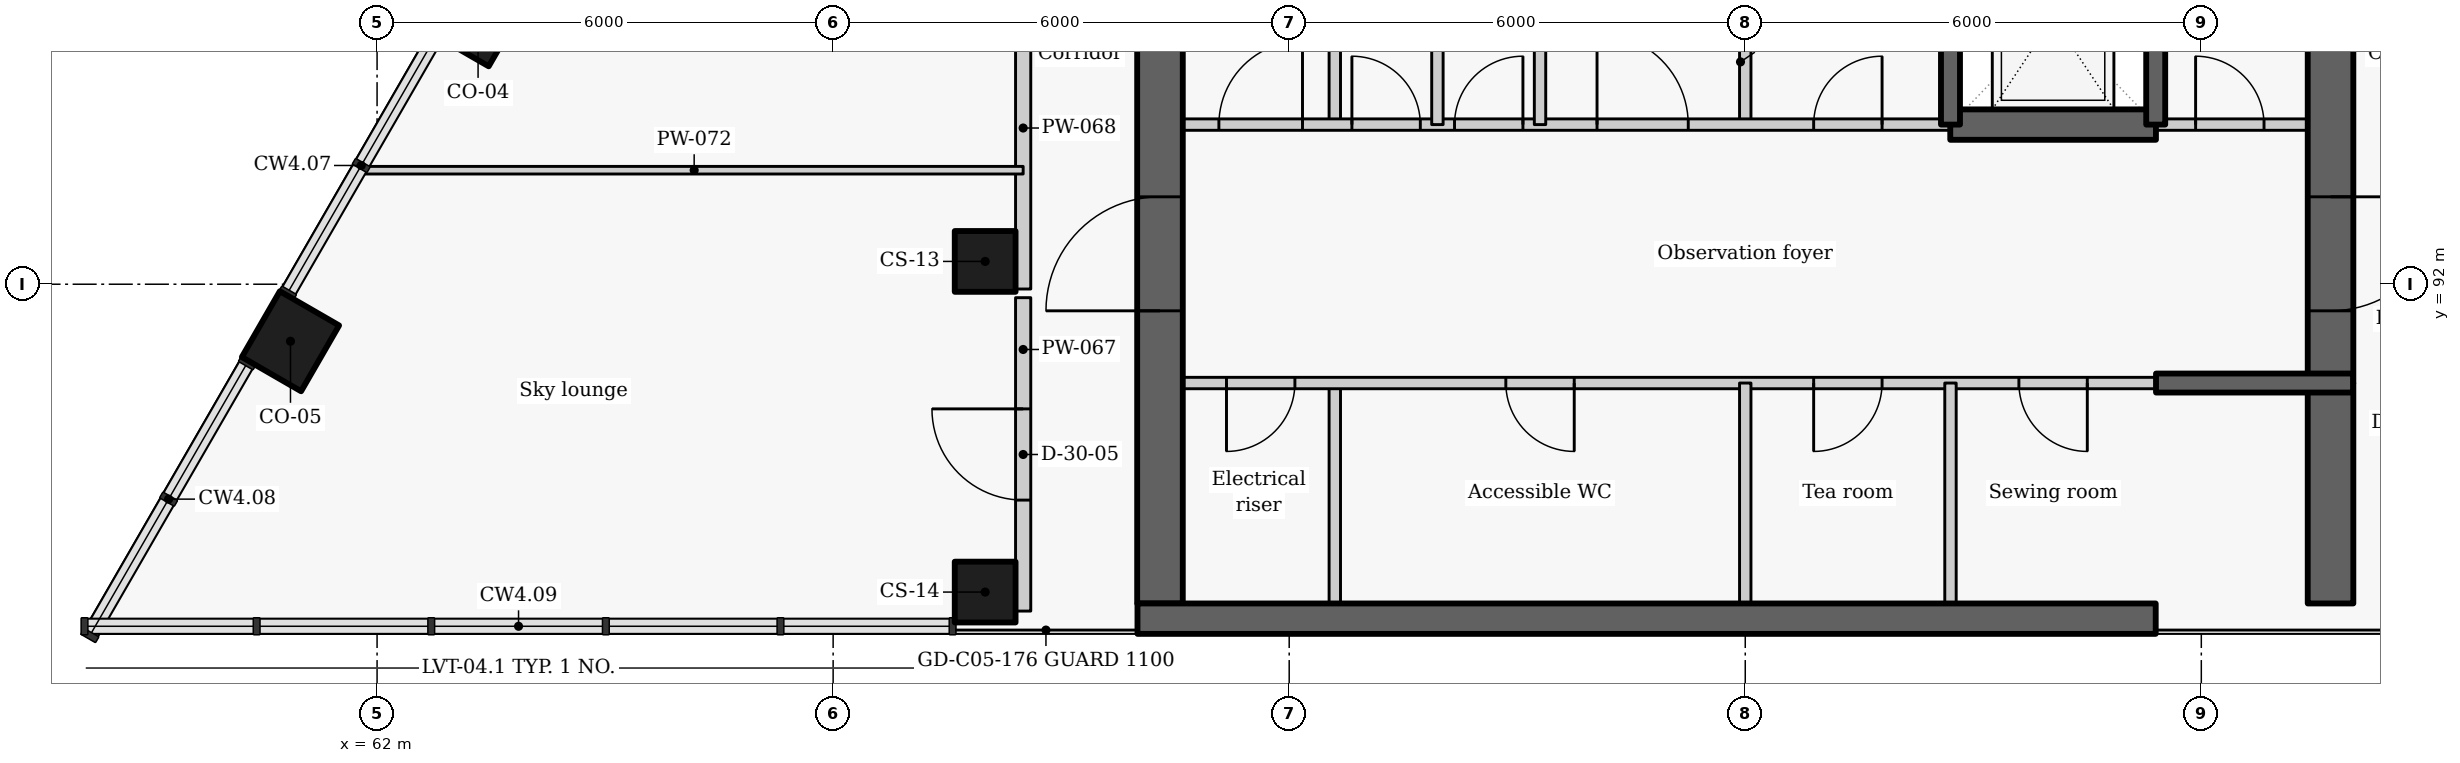
"""IFC4 building model, lengths in metres.
Left out: names, types, materials, properties, quantities, classifications, styles, units other than length and angle.
Written with IfcOpenShell. Run it as: python <this file> out.ifc"""

import sys

from ifc_helpers import new_model, si_unit, direction, frame, frame_2d, origin, origin_2d, place, context, subcontext, project, spatial, rectangle, extrude, element, fill, save


model = new_model("IFC4")
c1 = context("Model", 3, precision=1e-05, world=origin(), true_north=direction((0.0, 1.0)))
c2 = subcontext(c1, "Body", "Model", "MODEL_VIEW")
j1 = project(units=[si_unit("LENGTHUNIT", "METRE"), si_unit("PLANEANGLEUNIT", "RADIAN")], contexts=[c1])
p1 = place(None, origin())
s1 = spatial("IfcSite", under=j1, at=p1, CompositionType="ELEMENT")
p2 = place(p1, origin())
s2 = spatial("IfcBuilding", under=s1, at=p2, CompositionType="ELEMENT")
p3 = place(p2, frame((0.0, 0.0, 286.8)))
s3 = spatial("IfcBuildingStorey", under=s2, at=p3, CompositionType="ELEMENT", Elevation=286.8)
for number, where, z_axis, x_axis in (
    (1, (63.329, 95.525, 0.0), (0.0, 0.0, 1.0), (-0.5, -0.866, 0.0)),
    (2, (60.861, 91.25, 0.0), (0.0, 0.0, 1.0), (-0.5, -0.866, 0.0)),
):
    element("IfcColumn", number, at=place(p3, frame(where, z_axis=z_axis, x_axis=x_axis)), inside=s3, PredefinedType="COLUMN", context=c2, shape_type="SweptSolid", body=[
        extrude(rectangle(XDim=1.0, YDim=0.9, at=origin_2d()), origin(), (0.0, 0.0, 1.0), 3.6),
    ])
for number, where, z_axis, x_axis in (
    (3, (70.0, 92.3, 0.0), (0.0, 0.0, 1.0), (0.0, -1.0, 0.0)),
    (4, (70.0, 87.95, 0.0), (0.0, 0.0, 1.0), (0.0, -1.0, 0.0)),
):
    element("IfcColumn", number, at=place(p3, frame(where, z_axis=z_axis, x_axis=x_axis)), inside=s3, PredefinedType="COLUMN", context=c2, shape_type="SweptSolid", body=[
        extrude(rectangle(XDim=0.8, YDim=0.8, at=origin_2d()), origin(), (0.0, 0.0, 1.0), 3.6),
    ])
p4 = place(p3, frame((74.6, 87.8, 0.0), z_axis=(0.0, 0.0, 1.0), x_axis=(0.0, 1.0, 0.0)))
e5 = element("IfcWall", 5, at=p4, inside=s3, PredefinedType="PARTITIONING", context=c2, shape_type="SweptSolid", body=[
    extrude(rectangle(XDim=2.9, YDim=0.15, at=frame_2d((1.45, 0.0))), origin(), (0.0, 0.0, 1.0), 3.325),
])
p5 = place(p3, frame((74.6, 94.1, 0.0), z_axis=(0.0, 0.0, 1.0), x_axis=(0.0, 1.0, 0.0)))
e6 = element("IfcWall", 6, at=p5, inside=s3, PredefinedType="PARTITIONING", context=c2, shape_type="SweptSolid", body=[
    extrude(rectangle(XDim=2.8, YDim=0.15, at=frame_2d((1.4, 0.0))), origin(), (0.0, 0.0, 1.0), 3.325),
])
p6 = place(p3, frame((85.4, 90.7, 0.0), z_axis=(0.0, 0.0, 1.0), x_axis=(-1.0, 0.0, 0.0)))
e7 = element("IfcWall", 7, at=p6, inside=s3, PredefinedType="PARTITIONING", context=c2, shape_type="SweptSolid", body=[
    extrude(rectangle(XDim=13.4, YDim=0.15, at=frame_2d((6.7, 0.0))), origin(), (0.0, 0.0, 1.0), 3.325),
])
p7 = place(p6, frame((11.325, 0.0, 0.0)))
e8 = element("IfcOpeningElement", 8, at=p7, cuts=e7, PredefinedType="OPENING", context=c2, shape_type="SweptSolid", body=[
    extrude(rectangle(XDim=0.9, YDim=2.1, at=frame_2d((0.45, 1.05))), frame((0.0, 0.085, 0.0), z_axis=(0.0, -1.0, 0.0), x_axis=(1.0, 0.0, 0.0)), (0.0, 0.0, 1.0), 0.17),
])
p8 = place(p6, frame((7.65, 0.0, 0.0)))
e9 = element("IfcOpeningElement", 9, at=p8, cuts=e7, PredefinedType="OPENING", context=c2, shape_type="SweptSolid", body=[
    extrude(rectangle(XDim=0.9, YDim=2.1, at=frame_2d((0.45, 1.05))), frame((0.0, 0.085, 0.0), z_axis=(0.0, -1.0, 0.0), x_axis=(1.0, 0.0, 0.0)), (0.0, 0.0, 1.0), 0.17),
])
p9 = place(p6, frame((3.6, 0.0, 0.0)))
e10 = element("IfcOpeningElement", 10, at=p9, cuts=e7, PredefinedType="OPENING", context=c2, shape_type="SweptSolid", body=[
    extrude(rectangle(XDim=0.9, YDim=2.1, at=frame_2d((0.45, 1.05))), frame((0.0, 0.085, 0.0), z_axis=(0.0, -1.0, 0.0), x_axis=(1.0, 0.0, 0.0)), (0.0, 0.0, 1.0), 0.17),
])
p10 = place(p6, frame((0.9, 0.0, 0.0)))
e11 = element("IfcOpeningElement", 11, at=p10, cuts=e7, PredefinedType="OPENING", context=c2, shape_type="SweptSolid", body=[
    extrude(rectangle(XDim=0.9, YDim=2.1, at=frame_2d((0.45, 1.05))), frame((0.0, 0.085, 0.0), z_axis=(0.0, -1.0, 0.0), x_axis=(1.0, 0.0, 0.0)), (0.0, 0.0, 1.0), 0.17),
])
p11 = place(p3, frame((72.3, 87.8, -0.275), z_axis=(0.0, 0.0, 1.0), x_axis=(0.0, 1.0, 0.0)))
e12 = element("IfcWall", 12, at=p11, inside=s3, PredefinedType="SHEAR", context=c2, shape_type="SweptSolid", body=[
    extrude(rectangle(XDim=9.1, YDim=0.6, at=frame_2d((4.55, 0.0))), origin(), (0.0, 0.0, 1.0), 3.6),
])
p12 = place(p11, frame((3.85, 0.0, 0.275)))
e13 = element("IfcOpeningElement", 13, at=p12, cuts=e12, PredefinedType="OPENING", context=c2, shape_type="SweptSolid", body=[
    extrude(rectangle(XDim=1.5, YDim=2.1, at=frame_2d((0.75, 1.05))), frame((0.0, 0.31, 0.0), z_axis=(0.0, -1.0, 0.0), x_axis=(1.0, 0.0, 0.0)), (0.0, 0.0, 1.0), 0.62),
])
p13 = place(p3, frame((80.0, 87.8, 0.0), z_axis=(0.0, 0.0, 1.0), x_axis=(0.0, 1.0, 0.0)))
e14 = element("IfcWall", 14, at=p13, inside=s3, PredefinedType="PARTITIONING", context=c2, shape_type="SweptSolid", body=[
    extrude(rectangle(XDim=2.9, YDim=0.15, at=frame_2d((1.45, 0.0))), origin(), (0.0, 0.0, 1.0), 3.325),
])
p14 = place(p3, frame((80.0, 94.1, 0.0), z_axis=(0.0, 0.0, 1.0), x_axis=(0.0, 1.0, 0.0)))
e15 = element("IfcWall", 15, at=p14, inside=s3, PredefinedType="PARTITIONING", context=c2, shape_type="SweptSolid", body=[
    extrude(rectangle(XDim=2.8, YDim=0.15, at=frame_2d((1.4, 0.0))), origin(), (0.0, 0.0, 1.0), 3.325),
])
p15 = place(p3, frame((82.7, 87.8, 0.0), z_axis=(0.0, 0.0, 1.0), x_axis=(0.0, 1.0, 0.0)))
e16 = element("IfcWall", 16, at=p15, inside=s3, PredefinedType="PARTITIONING", context=c2, shape_type="SweptSolid", body=[
    extrude(rectangle(XDim=2.9, YDim=0.15, at=frame_2d((1.45, 0.0))), origin(), (0.0, 0.0, 1.0), 3.325),
])
p16 = place(p3, frame((72.0, 94.1, 0.0), z_axis=(0.0, 0.0, 1.0), x_axis=(1.0, 0.0, 0.0)))
e17 = element("IfcWall", 17, at=p16, inside=s3, PredefinedType="PARTITIONING", context=c2, shape_type="SweptSolid", body=[
    extrude(rectangle(XDim=10.703, YDim=0.15, at=frame_2d((5.352, 0.0))), origin(), (0.0, 0.0, 1.0), 3.325),
])
p17 = place(p16, frame((1.075, 0.0, 0.0)))
e18 = element("IfcOpeningElement", 18, at=p17, cuts=e17, PredefinedType="OPENING", context=c2, shape_type="SweptSolid", body=[
    extrude(rectangle(XDim=1.1, YDim=2.1, at=frame_2d((0.55, 1.05))), frame((0.0, 0.085, 0.0), z_axis=(0.0, -1.0, 0.0), x_axis=(1.0, 0.0, 0.0)), (0.0, 0.0, 1.0), 0.17),
])
p18 = place(p16, frame((2.825, 0.0, 0.0)))
e19 = element("IfcOpeningElement", 19, at=p18, cuts=e17, PredefinedType="OPENING", context=c2, shape_type="SweptSolid", body=[
    extrude(rectangle(XDim=0.9, YDim=2.1, at=frame_2d((0.45, 1.05))), frame((0.0, 0.085, 0.0), z_axis=(0.0, -1.0, 0.0), x_axis=(1.0, 0.0, 0.0)), (0.0, 0.0, 1.0), 0.17),
])
p19 = place(p16, frame((4.175, 0.0, 0.0)))
e20 = element("IfcOpeningElement", 20, at=p19, cuts=e17, PredefinedType="OPENING", context=c2, shape_type="SweptSolid", body=[
    extrude(rectangle(XDim=0.9, YDim=2.1, at=frame_2d((0.45, 1.05))), frame((0.0, 0.085, 0.0), z_axis=(0.0, -1.0, 0.0), x_axis=(1.0, 0.0, 0.0)), (0.0, 0.0, 1.0), 0.17),
])
p20 = place(p16, frame((6.05, 0.0, 0.0)))
e21 = element("IfcOpeningElement", 21, at=p20, cuts=e17, PredefinedType="OPENING", context=c2, shape_type="SweptSolid", body=[
    extrude(rectangle(XDim=1.2, YDim=2.1, at=frame_2d((0.6, 1.05))), frame((0.0, 0.085, 0.0), z_axis=(0.0, -1.0, 0.0), x_axis=(1.0, 0.0, 0.0)), (0.0, 0.0, 1.0), 0.17),
])
p21 = place(p16, frame((8.9, 0.0, 0.0)))
e22 = element("IfcOpeningElement", 22, at=p21, cuts=e17, PredefinedType="OPENING", context=c2, shape_type="SweptSolid", body=[
    extrude(rectangle(XDim=0.9, YDim=2.1, at=frame_2d((0.45, 1.05))), frame((0.0, 0.085, 0.0), z_axis=(0.0, -1.0, 0.0), x_axis=(1.0, 0.0, 0.0)), (0.0, 0.0, 1.0), 0.17),
])
p22 = place(p3, frame((85.397, 94.1, 0.0), z_axis=(0.0, 0.0, 1.0), x_axis=(1.0, 0.0, 0.0)))
e23 = element("IfcWall", 23, at=p22, inside=s3, PredefinedType="PARTITIONING", context=c2, shape_type="SweptSolid", body=[
    extrude(rectangle(XDim=2.603, YDim=0.15, at=frame_2d((1.302, 0.0))), origin(), (0.0, 0.0, 1.0), 3.325),
])
p23 = place(p22, frame((0.528, 0.0, 0.0)))
e24 = element("IfcOpeningElement", 24, at=p23, cuts=e23, PredefinedType="OPENING", context=c2, shape_type="SweptSolid", body=[
    extrude(rectangle(XDim=0.9, YDim=2.1, at=frame_2d((0.45, 1.05))), frame((0.0, 0.085, 0.0), z_axis=(0.0, -1.0, 0.0), x_axis=(1.0, 0.0, 0.0)), (0.0, 0.0, 1.0), 0.17),
])
p24 = place(p3, frame((82.697, 94.1, -0.275), z_axis=(0.0, 0.0, 1.0), x_axis=(1.0, 0.0, 0.0)))
e25 = element("IfcWall", 25, at=p24, inside=s3, PredefinedType="SHEAR", context=c2, shape_type="SweptSolid", body=[
    extrude(rectangle(XDim=2.706, YDim=0.4, at=frame_2d((1.353, 0.0))), origin(), (0.0, 0.0, 1.0), 3.6),
])
p25 = place(p3, frame((87.7, 102.05, -0.275), z_axis=(0.0, 0.0, 1.0), x_axis=(0.0, -1.0, 0.0)))
e26 = element("IfcWall", 26, at=p25, inside=s3, PredefinedType="SHEAR", context=c2, shape_type="SweptSolid", body=[
    extrude(rectangle(XDim=11.35, YDim=0.6, at=frame_2d((5.675, 0.0))), origin(), (0.0, 0.0, 1.0), 3.6),
])
p26 = place(p25, frame((8.9, 0.0, 0.275)))
e27 = element("IfcOpeningElement", 27, at=p26, cuts=e26, PredefinedType="OPENING", context=c2, shape_type="SweptSolid", body=[
    extrude(rectangle(XDim=1.5, YDim=2.1, at=frame_2d((0.75, 1.05))), frame((0.0, 0.31, 0.0), z_axis=(0.0, -1.0, 0.0), x_axis=(1.0, 0.0, 0.0)), (0.0, 0.0, 1.0), 0.62),
])
p27 = place(p25, frame((2.025, 0.0, 0.275)))
e28 = element("IfcOpeningElement", 28, at=p27, cuts=e26, PredefinedType="OPENING", context=c2, shape_type="SweptSolid", body=[
    extrude(rectangle(XDim=1.1, YDim=2.1, at=frame_2d((0.55, 1.05))), frame((0.0, 0.31, 0.0), z_axis=(0.0, -1.0, 0.0), x_axis=(1.0, 0.0, 0.0)), (0.0, 0.0, 1.0), 0.62),
])
for number, where, z_axis, x_axis in (
    (29, (75.95, 94.1, 0.0), (0.0, 0.0, 1.0), (0.0, 1.0, 0.0)),
    (30, (77.3, 94.1, 0.0), (0.0, 0.0, 1.0), (0.0, 1.0, 0.0)),
):
    element("IfcWall", number, at=place(p3, frame(where, z_axis=z_axis, x_axis=x_axis)), inside=s3, PredefinedType="PARTITIONING", context=c2, shape_type="SweptSolid", body=[
        extrude(rectangle(XDim=2.8, YDim=0.15, at=frame_2d((1.4, 0.0))), origin(), (0.0, 0.0, 1.0), 3.325),
    ])
for number, where, z_axis, x_axis in (
    (31, (82.7, 94.1, -0.275), (0.0, 0.0, 1.0), (0.0, 1.0, 0.0)),
    (32, (85.4, 94.1, -0.275), (0.0, 0.0, 1.0), (0.0, 1.0, 0.0)),
):
    element("IfcWall", number, at=place(p3, frame(where, z_axis=z_axis, x_axis=x_axis)), inside=s3, PredefinedType="SHEAR", context=c2, shape_type="SweptSolid", body=[
        extrude(rectangle(XDim=2.8, YDim=0.25, at=frame_2d((1.4, 0.0))), origin(), (0.0, 0.0, 1.0), 3.6),
    ])
p28 = place(p3, frame((70.5, 87.7, 0.0), z_axis=(0.0, 0.0, 1.0), x_axis=(0.0, 1.0, 0.0)))
e33 = element("IfcWall", 33, at=p28, inside=s3, PredefinedType="PARTITIONING", context=c2, shape_type="SweptSolid", body=[
    extrude(rectangle(XDim=4.123, YDim=0.2, at=frame_2d((2.062, 0.0))), origin(), (0.0, 0.0, 1.0), 3.325),
])
p29 = place(p28, frame((1.46, 0.0, 0.0)))
e34 = element("IfcOpeningElement", 34, at=p29, cuts=e33, PredefinedType="OPENING", context=c2, shape_type="SweptSolid", body=[
    extrude(rectangle(XDim=1.2, YDim=2.1, at=frame_2d((0.6, 1.05))), frame((0.0, 0.11, 0.0), z_axis=(0.0, -1.0, 0.0), x_axis=(1.0, 0.0, 0.0)), (0.0, 0.0, 1.0), 0.22),
])
p30 = place(p3, frame((70.5, 91.937, 0.0), z_axis=(0.0, 0.0, 1.0), x_axis=(0.0, 1.0, 0.0)))
e35 = element("IfcWall", 35, at=p30, inside=s3, PredefinedType="PARTITIONING", context=c2, shape_type="SweptSolid", body=[
    extrude(rectangle(XDim=4.236, YDim=0.2, at=frame_2d((2.118, 0.0))), origin(), (0.0, 0.0, 1.0), 3.325),
])
p31 = place(p3, frame((61.844, 93.5, 0.0), z_axis=(0.0, 0.0, 1.0), x_axis=(1.0, 0.0, 0.0)))
e36 = element("IfcWall", 36, at=p31, inside=s3, PredefinedType="PARTITIONING", context=c2, shape_type="SweptSolid", body=[
    extrude(rectangle(XDim=8.656, YDim=0.1, at=frame_2d((4.328, 0.0))), origin(), (0.0, 0.0, 1.0), 2.705),
])
p32 = place(p3, frame((72.004, 87.6, -0.275), z_axis=(0.0, 0.0, 1.0), x_axis=(1.0, 0.0, 0.0)))
e37 = element("IfcWall", 37, at=p32, inside=s3, PredefinedType="SHEAR", context=c2, shape_type="SweptSolid", body=[
    extrude(rectangle(XDim=13.396, YDim=0.4, at=frame_2d((6.698, 0.0))), origin(), (0.0, 0.0, 1.0), 3.6),
])
p33 = place(p3, frame((87.7, 87.8, -0.275), z_axis=(0.0, 0.0, 1.0), x_axis=(0.0, 1.0, 0.0)))
e38 = element("IfcWall", 38, at=p33, inside=s3, PredefinedType="SHEAR", context=c2, shape_type="SweptSolid", body=[
    extrude(rectangle(XDim=2.896, YDim=0.6, at=frame_2d((1.448, 0.0))), origin(), (0.0, 0.0, 1.0), 3.6),
])
p34 = place(p3, frame((85.404, 90.7, -0.275), z_axis=(0.0, 0.0, 1.0), x_axis=(1.0, 0.0, 0.0)))
e39 = element("IfcWall", 39, at=p34, inside=s3, PredefinedType="SHEAR", context=c2, shape_type="SweptSolid", body=[
    extrude(rectangle(XDim=2.592, YDim=0.25, at=frame_2d((1.296, 0.0))), origin(), (0.0, 0.0, 1.0), 3.6),
])
p35 = place(p7, origin())
e40 = element("IfcDoor", 40, at=p35, inside=s3, OperationType="SINGLE_SWING_RIGHT", PredefinedType="DOOR", context=c2, shape_type="SweptSolid", body=[
    extrude(rectangle(XDim=0.9, YDim=2.1, at=frame_2d((0.45, 1.05))), frame((0.0, 0.025, 0.0), z_axis=(0.0, -1.0, 0.0), x_axis=(1.0, 0.0, 0.0)), (0.0, 0.0, 1.0), 0.05),
])
fill(e8, e40)
p36 = place(p8, origin())
e41 = element("IfcDoor", 41, at=p36, inside=s3, OperationType="SINGLE_SWING_LEFT", PredefinedType="DOOR", context=c2, shape_type="SweptSolid", body=[
    extrude(rectangle(XDim=0.9, YDim=2.1, at=frame_2d((0.45, 1.05))), frame((0.0, 0.025, 0.0), z_axis=(0.0, -1.0, 0.0), x_axis=(1.0, 0.0, 0.0)), (0.0, 0.0, 1.0), 0.05),
])
fill(e9, e41)
p37 = place(p9, origin())
e42 = element("IfcDoor", 42, at=p37, inside=s3, OperationType="SINGLE_SWING_RIGHT", PredefinedType="DOOR", context=c2, shape_type="SweptSolid", body=[
    extrude(rectangle(XDim=0.9, YDim=2.1, at=frame_2d((0.45, 1.05))), frame((0.0, 0.025, 0.0), z_axis=(0.0, -1.0, 0.0), x_axis=(1.0, 0.0, 0.0)), (0.0, 0.0, 1.0), 0.05),
])
fill(e10, e42)
p38 = place(p10, origin())
e43 = element("IfcDoor", 43, at=p38, inside=s3, OperationType="SINGLE_SWING_LEFT", PredefinedType="DOOR", context=c2, shape_type="SweptSolid", body=[
    extrude(rectangle(XDim=0.9, YDim=2.1, at=frame_2d((0.45, 1.05))), frame((0.0, 0.025, 0.0), z_axis=(0.0, -1.0, 0.0), x_axis=(1.0, 0.0, 0.0)), (0.0, 0.0, 1.0), 0.05),
])
fill(e11, e43)
p39 = place(p17, origin())
e44 = element("IfcDoor", 44, at=p39, inside=s3, OperationType="SINGLE_SWING_RIGHT", PredefinedType="DOOR", context=c2, shape_type="SweptSolid", body=[
    extrude(rectangle(XDim=1.1, YDim=2.1, at=frame_2d((0.55, 1.05))), frame((0.0, 0.025, 0.0), z_axis=(0.0, -1.0, 0.0), x_axis=(1.0, 0.0, 0.0)), (0.0, 0.0, 1.0), 0.05),
])
fill(e18, e44)
p40 = place(p18, origin())
e45 = element("IfcDoor", 45, at=p40, inside=s3, OperationType="SINGLE_SWING_LEFT", PredefinedType="DOOR", context=c2, shape_type="SweptSolid", body=[
    extrude(rectangle(XDim=0.9, YDim=2.1, at=frame_2d((0.45, 1.05))), frame((0.0, 0.025, 0.0), z_axis=(0.0, -1.0, 0.0), x_axis=(1.0, 0.0, 0.0)), (0.0, 0.0, 1.0), 0.05),
])
fill(e19, e45)
p41 = place(p19, origin())
e46 = element("IfcDoor", 46, at=p41, inside=s3, OperationType="SINGLE_SWING_RIGHT", PredefinedType="DOOR", context=c2, shape_type="SweptSolid", body=[
    extrude(rectangle(XDim=0.9, YDim=2.1, at=frame_2d((0.45, 1.05))), frame((0.0, 0.025, 0.0), z_axis=(0.0, -1.0, 0.0), x_axis=(1.0, 0.0, 0.0)), (0.0, 0.0, 1.0), 0.05),
])
fill(e20, e46)
p42 = place(p20, origin())
e47 = element("IfcDoor", 47, at=p42, inside=s3, OperationType="DOUBLE_DOOR_SINGLE_SWING", PredefinedType="DOOR", context=c2, shape_type="SweptSolid", body=[
    extrude(rectangle(XDim=1.2, YDim=2.1, at=frame_2d((0.6, 1.05))), frame((0.0, 0.025, 0.0), z_axis=(0.0, -1.0, 0.0), x_axis=(1.0, 0.0, 0.0)), (0.0, 0.0, 1.0), 0.05),
])
fill(e21, e47)
p43 = place(p21, origin())
e48 = element("IfcDoor", 48, at=p43, inside=s3, OperationType="SINGLE_SWING_RIGHT", PredefinedType="DOOR", context=c2, shape_type="SweptSolid", body=[
    extrude(rectangle(XDim=0.9, YDim=2.1, at=frame_2d((0.45, 1.05))), frame((0.0, 0.025, 0.0), z_axis=(0.0, -1.0, 0.0), x_axis=(1.0, 0.0, 0.0)), (0.0, 0.0, 1.0), 0.05),
])
fill(e22, e48)
p44 = place(p23, origin())
e49 = element("IfcDoor", 49, at=p44, inside=s3, OperationType="SINGLE_SWING_LEFT", PredefinedType="DOOR", context=c2, shape_type="SweptSolid", body=[
    extrude(rectangle(XDim=0.9, YDim=2.1, at=frame_2d((0.45, 1.05))), frame((0.0, 0.025, 0.0), z_axis=(0.0, -1.0, 0.0), x_axis=(1.0, 0.0, 0.0)), (0.0, 0.0, 1.0), 0.05),
])
fill(e24, e49)
p45 = place(p29, origin())
e50 = element("IfcDoor", 50, at=p45, inside=s3, OperationType="SINGLE_SWING_RIGHT", PredefinedType="DOOR", context=c2, shape_type="SweptSolid", body=[
    extrude(rectangle(XDim=1.2, YDim=2.1, at=frame_2d((0.6, 1.05))), frame((0.0, 0.025, 0.0), z_axis=(0.0, -1.0, 0.0), x_axis=(1.0, 0.0, 0.0)), (0.0, 0.0, 1.0), 0.05),
])
fill(e34, e50)
p46 = place(p26, origin())
e51 = element("IfcDoor", 51, at=p46, inside=s3, OperationType="DOUBLE_DOOR_SINGLE_SWING", PredefinedType="DOOR", context=c2, shape_type="SweptSolid", body=[
    extrude(rectangle(XDim=1.5, YDim=2.1, at=frame_2d((0.75, 1.05))), frame((0.0, 0.025, 0.0), z_axis=(0.0, -1.0, 0.0), x_axis=(1.0, 0.0, 0.0)), (0.0, 0.0, 1.0), 0.05),
])
fill(e27, e51)
p47 = place(p12, origin())
e52 = element("IfcDoor", 52, at=p47, inside=s3, OperationType="DOUBLE_DOOR_SINGLE_SWING", PredefinedType="DOOR", context=c2, shape_type="SweptSolid", body=[
    extrude(rectangle(XDim=1.5, YDim=2.1, at=frame_2d((0.75, 1.05))), frame((0.0, 0.025, 0.0), z_axis=(0.0, -1.0, 0.0), x_axis=(1.0, 0.0, 0.0)), (0.0, 0.0, 1.0), 0.05),
])
fill(e13, e52)
save(model, sys.argv[1])
